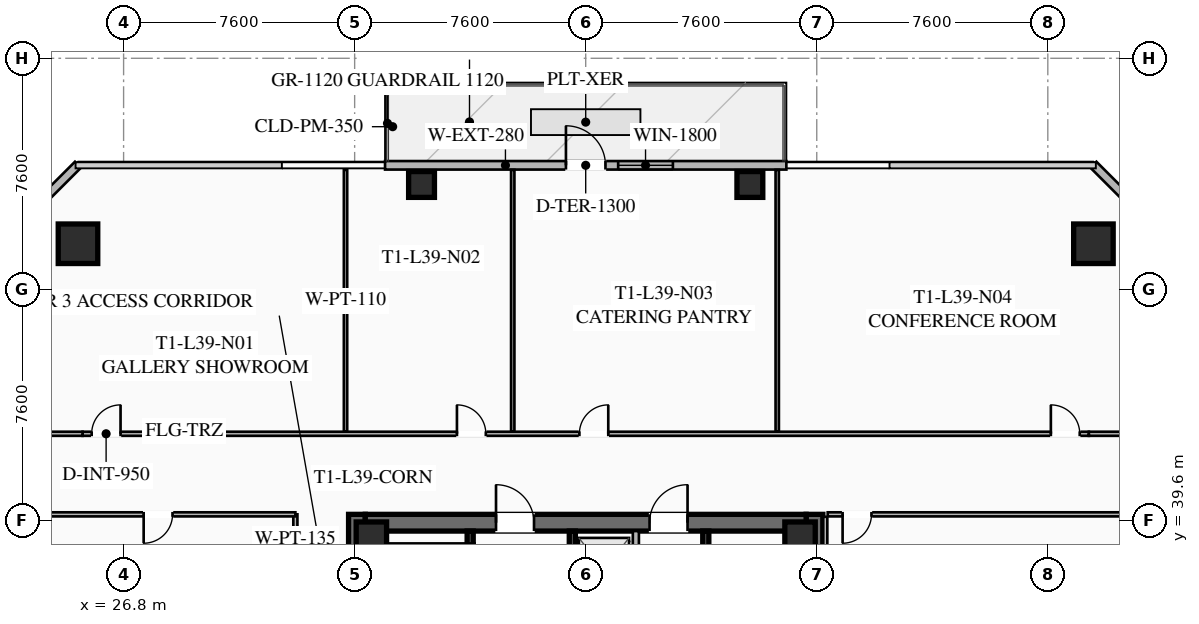
"""IFC4 building model, lengths in metres.
Left out: names, types, materials, properties, quantities, classifications, styles, units other than length and angle.
Written with IfcOpenShell. Run it as: python <this file> out.ifc"""

import sys

from ifc_helpers import new_model, si_unit, direction, frame, frame_2d, origin, origin_2d, place, context, subcontext, project, spatial, rectangle, hollow_rectangle, extrude, element, fill, save


model = new_model("IFC4")
c1 = context("Model", 3, precision=1e-05, world=origin(), true_north=direction((0.0, 1.0)))
c2 = subcontext(c1, "Body", "Model", "MODEL_VIEW")
j1 = project(units=[si_unit("LENGTHUNIT", "METRE"), si_unit("PLANEANGLEUNIT", "RADIAN")], contexts=[c1])
p1 = place(None, origin())
s1 = spatial("IfcSite", under=j1, at=p1, CompositionType="ELEMENT")
p2 = place(p1, origin())
s2 = spatial("IfcBuilding", under=s1, at=p2, CompositionType="ELEMENT")
p3 = place(p2, frame((0.0, 0.0, 146.35)))
s3 = spatial("IfcBuildingStorey", under=s2, at=p3, CompositionType="ELEMENT", Elevation=146.35)
for number, where, z_axis, x_axis in (
    (1, (34.475, 24.2, 0.0), (0.0, 0.0, 1.0), (0.0, 1.0, 0.0)),
    (2, (49.525, 39.8, 0.0), (0.0, 0.0, 1.0), (0.0, -1.0, 0.0)),
):
    element("IfcWall", number, at=place(p3, frame(where, z_axis=z_axis, x_axis=x_axis)), inside=s3, PredefinedType="SHEAR", context=c2, shape_type="SweptSolid", body=[
        extrude(rectangle(XDim=15.6, YDim=0.55, at=frame_2d((7.8, 0.0))), origin(), (0.0, 0.0, 1.0), 3.55),
    ])
p4 = place(p3, frame((34.75, 39.525, 0.0), z_axis=(0.0, 0.0, 1.0), x_axis=(1.0, 0.0, 0.0)))
e3 = element("IfcWall", 3, at=p4, inside=s3, PredefinedType="SHEAR", context=c2, shape_type="SweptSolid", body=[
    extrude(rectangle(XDim=14.5, YDim=0.55, at=frame_2d((7.25, 0.0))), origin(), (0.0, 0.0, 1.0), 3.55),
])
p5 = place(p4, frame((4.3, 0.0, 0.0)))
e4 = element("IfcOpeningElement", 4, at=p5, cuts=e3, PredefinedType="OPENING", context=c2, shape_type="SweptSolid", body=[
    extrude(rectangle(XDim=1.25, YDim=2.25, at=frame_2d((0.625, 1.125))), frame((0.0, 0.285, 0.0), z_axis=(0.0, -1.0, 0.0), x_axis=(1.0, 0.0, 0.0)), (0.0, 0.0, 1.0), 0.57),
])
p6 = place(p4, frame((9.35, 0.0, 0.0)))
e5 = element("IfcOpeningElement", 5, at=p6, cuts=e3, PredefinedType="OPENING", context=c2, shape_type="SweptSolid", body=[
    extrude(rectangle(XDim=1.25, YDim=2.25, at=frame_2d((0.625, 1.125))), frame((0.0, 0.285, 0.0), z_axis=(0.0, -1.0, 0.0), x_axis=(1.0, 0.0, 0.0)), (0.0, 0.0, 1.0), 0.57),
])
for number, where, z_axis, x_axis in (
    (6, (49.05, 39.05, 0.0), (0.0, 0.0, 1.0), (1.0, 0.0, 0.0)),
    (7, (34.95, 39.05, 0.0), (0.0, 0.0, 1.0), (1.0, 0.0, 0.0)),
):
    element("IfcColumn", number, at=place(p3, frame(where, z_axis=z_axis, x_axis=x_axis)), inside=s3, PredefinedType="COLUMN", context=c2, shape_type="SweptSolid", body=[
        extrude(hollow_rectangle(XDim=1.0, YDim=1.0, WallThickness=0.04, at=origin_2d()), origin(), (0.0, 0.0, 1.0), 3.37),
    ])
for number, where, z_axis, x_axis in (
    (8, (58.7, 48.7, 0.0), (0.0, 0.0, 1.0), (1.0, 0.0, 0.0)),
    (9, (25.3, 48.7, 0.0), (0.0, 0.0, 1.0), (1.0, 0.0, 0.0)),
):
    element("IfcColumn", number, at=place(p3, frame(where, z_axis=z_axis, x_axis=x_axis)), inside=s3, PredefinedType="COLUMN", context=c2, shape_type="SweptSolid", body=[
        extrude(hollow_rectangle(XDim=1.3, YDim=1.3, WallThickness=0.05, at=origin_2d()), origin(), (0.0, 0.0, 1.0), 3.37),
    ])
for number, where, z_axis, x_axis in (
    (10, (47.4, 50.65, 0.0), (0.0, 0.0, 1.0), (1.0, 0.0, 0.0)),
    (11, (36.6, 50.65, 0.0), (0.0, 0.0, 1.0), (1.0, 0.0, 0.0)),
):
    element("IfcColumn", number, at=place(p3, frame(where, z_axis=z_axis, x_axis=x_axis)), inside=s3, PredefinedType="COLUMN", context=c2, shape_type="SweptSolid", body=[
        extrude(hollow_rectangle(XDim=0.85, YDim=0.85, WallThickness=0.035, at=origin_2d()), origin(), (0.0, 0.0, 1.0), 3.37),
    ])
p7 = place(p3, frame((35.4, 51.28, 0.0), z_axis=(0.0, 0.0, 1.0), x_axis=(1.0, 0.0, 0.0)))
e12 = element("IfcWall", 12, at=p7, inside=s3, PredefinedType="SOLIDWALL", context=c2, shape_type="SweptSolid", body=[
    extrude(rectangle(XDim=13.2, YDim=0.28, at=frame_2d((6.6, 0.0))), origin(), (0.0, 0.0, 1.0), 3.37),
])
p8 = place(p7, frame((5.95, 0.0, 0.0)))
e13 = element("IfcOpeningElement", 13, at=p8, cuts=e12, PredefinedType="OPENING", context=c2, shape_type="SweptSolid", body=[
    extrude(rectangle(XDim=1.3, YDim=2.15, at=frame_2d((0.65, 1.075))), frame((0.0, 0.15, 0.0), z_axis=(0.0, -1.0, 0.0), x_axis=(1.0, 0.0, 0.0)), (0.0, 0.0, 1.0), 0.3),
])
p9 = place(p7, frame((7.668, 0.0, 0.85)))
e14 = element("IfcOpeningElement", 14, at=p9, cuts=e12, PredefinedType="OPENING", context=c2, shape_type="SweptSolid", body=[
    extrude(rectangle(XDim=1.8, YDim=1.92, at=frame_2d((0.9, 0.96))), frame((0.0, 0.15, 0.0), z_axis=(0.0, -1.0, 0.0), x_axis=(1.0, 0.0, 0.0)), (0.0, 0.0, 1.0), 0.3),
])
for number, where, z_axis, x_axis in (
    (15, (22.7, 48.7, 0.0), (0.0, 0.0, 1.0), (0.707, 0.707, 0.0)),
    (16, (58.7, 51.3, 0.0), (0.0, 0.0, 1.0), (0.707, -0.707, 0.0)),
):
    element("IfcWall", number, at=place(p3, frame(where, z_axis=z_axis, x_axis=x_axis)), inside=s3, PredefinedType="SOLIDWALL", context=c2, shape_type="SweptSolid", body=[
        extrude(rectangle(XDim=3.677, YDim=0.28, at=frame_2d((1.838, 0.0))), origin(), (0.0, 0.0, 1.0), 3.37),
    ])
p10 = place(p3, frame((38.2, 31.2, 0.0), z_axis=(0.0, 0.0, 1.0), x_axis=(0.0, 1.0, 0.0)))
e17 = element("IfcWall", 17, at=p10, inside=s3, PredefinedType="SHEAR", context=c2, shape_type="SweptSolid", body=[
    extrude(rectangle(XDim=8.05, YDim=0.2, at=frame_2d((4.025, 0.0))), origin(), (0.0, 0.0, 1.0), 3.37),
])
p11 = place(p10, frame((0.45, 0.0, 0.0)))
e18 = element("IfcOpeningElement", 18, at=p11, cuts=e17, PredefinedType="OPENING", context=c2, shape_type="SweptSolid", body=[
    extrude(rectangle(XDim=1.15, YDim=2.2, at=frame_2d((0.575, 1.1))), frame((0.0, 0.11, 0.0), z_axis=(0.0, -1.0, 0.0), x_axis=(1.0, 0.0, 0.0)), (0.0, 0.0, 1.0), 0.22),
])
p12 = place(p3, frame((41.56, 24.75, 0.0), z_axis=(0.0, 0.0, 1.0), x_axis=(0.0, 1.0, 0.0)))
e19 = element("IfcWall", 19, at=p12, inside=s3, PredefinedType="SHEAR", context=c2, shape_type="SweptSolid", body=[
    extrude(rectangle(XDim=14.5, YDim=0.2, at=frame_2d((7.25, 0.0))), origin(), (0.0, 0.0, 1.0), 3.37),
])
p13 = place(p3, frame((45.95, 39.25, 0.0), z_axis=(0.0, 0.0, 1.0), x_axis=(0.0, -1.0, 0.0)))
e20 = element("IfcWall", 20, at=p13, inside=s3, PredefinedType="SHEAR", context=c2, shape_type="SweptSolid", body=[
    extrude(rectangle(XDim=6.45, YDim=0.2, at=frame_2d((3.225, 0.0))), origin(), (0.0, 0.0, 1.0), 3.37),
])
p14 = place(p3, frame((43.65, 32.35, 0.0), z_axis=(0.0, 0.0, 1.0), x_axis=(0.0, 1.0, 0.0)))
e21 = element("IfcWall", 21, at=p14, inside=s3, PredefinedType="SOLIDWALL", context=c2, shape_type="SweptSolid", body=[
    extrude(rectangle(XDim=6.9, YDim=0.2, at=frame_2d((3.45, 0.0))), origin(), (0.0, 0.0, 1.0), 3.37),
])
p15 = place(p14, frame((0.575, 0.0, 0.0)))
e22 = element("IfcOpeningElement", 22, at=p15, cuts=e21, PredefinedType="OPENING", context=c2, shape_type="SweptSolid", body=[
    extrude(rectangle(XDim=1.1, YDim=2.2, at=frame_2d((0.55, 1.1))), frame((0.0, 0.11, 0.0), z_axis=(0.0, -1.0, 0.0), x_axis=(1.0, 0.0, 0.0)), (0.0, 0.0, 1.0), 0.22),
])
p16 = place(p14, frame((2.825, 0.0, 0.0)))
e23 = element("IfcOpeningElement", 23, at=p16, cuts=e21, PredefinedType="OPENING", context=c2, shape_type="SweptSolid", body=[
    extrude(rectangle(XDim=1.1, YDim=2.2, at=frame_2d((0.55, 1.1))), frame((0.0, 0.11, 0.0), z_axis=(0.0, -1.0, 0.0), x_axis=(1.0, 0.0, 0.0)), (0.0, 0.0, 1.0), 0.22),
])
p17 = place(p14, frame((5.075, 0.0, 0.0)))
e24 = element("IfcOpeningElement", 24, at=p17, cuts=e21, PredefinedType="OPENING", context=c2, shape_type="SweptSolid", body=[
    extrude(rectangle(XDim=1.1, YDim=2.2, at=frame_2d((0.55, 1.1))), frame((0.0, 0.11, 0.0), z_axis=(0.0, -1.0, 0.0), x_axis=(1.0, 0.0, 0.0)), (0.0, 0.0, 1.0), 0.22),
])
p18 = place(p3, frame((32.45, 35.4, 0.0), z_axis=(0.0, 0.0, 1.0), x_axis=(0.0, 1.0, 0.0)))
e25 = element("IfcWall", 25, at=p18, inside=s3, PredefinedType="PARTITIONING", context=c2, shape_type="SweptSolid", body=[
    extrude(rectangle(XDim=4.4, YDim=0.135, at=frame_2d((2.2, 0.0))), origin(), (0.0, 0.0, 1.0), 2.723),
])
p19 = place(p3, frame((25.45, 42.45, 0.0), z_axis=(0.0, 0.0, 1.0), x_axis=(1.0, 0.0, 0.0)))
e26 = element("IfcWall", 26, at=p19, inside=s3, PredefinedType="PARTITIONING", context=c2, shape_type="SweptSolid", body=[
    extrude(rectangle(XDim=33.1, YDim=0.135, at=frame_2d((16.55, 0.0))), origin(), (0.0, 0.0, 1.0), 2.723),
])
p20 = place(p19, frame((0.3, 0.0, 0.0)))
e27 = element("IfcOpeningElement", 27, at=p20, cuts=e26, PredefinedType="OPENING", context=c2, shape_type="SweptSolid", body=[
    extrude(rectangle(XDim=0.95, YDim=2.05, at=frame_2d((0.475, 1.025))), frame((0.0, 0.077, 0.0), z_axis=(0.0, -1.0, 0.0), x_axis=(1.0, 0.0, 0.0)), (0.0, 0.0, 1.0), 0.155),
])
p21 = place(p19, frame((12.315, 0.0, 0.0)))
e28 = element("IfcOpeningElement", 28, at=p21, cuts=e26, PredefinedType="OPENING", context=c2, shape_type="SweptSolid", body=[
    extrude(rectangle(XDim=0.95, YDim=2.05, at=frame_2d((0.475, 1.025))), frame((0.0, 0.077, 0.0), z_axis=(0.0, -1.0, 0.0), x_axis=(1.0, 0.0, 0.0)), (0.0, 0.0, 1.0), 0.155),
])
p22 = place(p19, frame((16.342, 0.0, 0.0)))
e29 = element("IfcOpeningElement", 29, at=p22, cuts=e26, PredefinedType="OPENING", context=c2, shape_type="SweptSolid", body=[
    extrude(rectangle(XDim=0.95, YDim=2.05, at=frame_2d((0.475, 1.025))), frame((0.0, 0.077, 0.0), z_axis=(0.0, -1.0, 0.0), x_axis=(1.0, 0.0, 0.0)), (0.0, 0.0, 1.0), 0.155),
])
p23 = place(p19, frame((31.85, 0.0, 0.0)))
e30 = element("IfcOpeningElement", 30, at=p23, cuts=e26, PredefinedType="OPENING", context=c2, shape_type="SweptSolid", body=[
    extrude(rectangle(XDim=0.95, YDim=2.05, at=frame_2d((0.475, 1.025))), frame((0.0, 0.077, 0.0), z_axis=(0.0, -1.0, 0.0), x_axis=(1.0, 0.0, 0.0)), (0.0, 0.0, 1.0), 0.155),
])
for number, where, z_axis, x_axis in (
    (31, (22.72, 42.45, 0.0), (0.0, 0.0, 1.0), (1.0, 0.0, 0.0)),
    (32, (58.55, 42.45, 0.0), (0.0, 0.0, 1.0), (1.0, 0.0, 0.0)),
):
    element("IfcWall", number, at=place(p3, frame(where, z_axis=z_axis, x_axis=x_axis)), inside=s3, PredefinedType="PARTITIONING", context=c2, shape_type="SweptSolid", body=[
        extrude(rectangle(XDim=2.73, YDim=0.135, at=frame_2d((1.365, 0.0))), origin(), (0.0, 0.0, 1.0), 2.723),
    ])
for number, where, z_axis, x_axis in (
    (33, (34.1, 42.53, 0.0), (0.0, 0.0, 1.0), (0.0, 1.0, 0.0)),
    (34, (39.6, 42.53, 0.0), (0.0, 0.0, 1.0), (0.0, 1.0, 0.0)),
    (35, (48.3, 42.53, 0.0), (0.0, 0.0, 1.0), (0.0, 1.0, 0.0)),
):
    element("IfcWall", number, at=place(p3, frame(where, z_axis=z_axis, x_axis=x_axis)), inside=s3, PredefinedType="PARTITIONING", context=c2, shape_type="SweptSolid", body=[
        extrude(rectangle(XDim=8.6, YDim=0.11, at=frame_2d((4.3, 0.0))), origin(), (0.0, 0.0, 1.0), 2.723),
    ])
p24 = place(p3, frame((49.88, 39.72, 0.0), z_axis=(0.0, 0.0, 1.0), x_axis=(0.0, -1.0, 0.0)))
e36 = element("IfcWall", 36, at=p24, inside=s3, PredefinedType="PARTITIONING", context=c2, shape_type="SweptSolid", body=[
    extrude(rectangle(XDim=15.44, YDim=0.135, at=frame_2d((7.72, 0.0))), origin(), (0.0, 0.0, 1.0), 2.723),
])
p25 = place(p3, frame((61.28, 39.8, 0.0), z_axis=(0.0, 0.0, 1.0), x_axis=(-1.0, 0.0, 0.0)))
e37 = element("IfcWall", 37, at=p25, inside=s3, PredefinedType="PARTITIONING", context=c2, shape_type="SweptSolid", body=[
    extrude(rectangle(XDim=11.32, YDim=0.135, at=frame_2d((5.66, 0.0))), origin(), (0.0, 0.0, 1.0), 2.723),
])
p26 = place(p25, frame((9.88, 0.0, 0.0)))
e38 = element("IfcOpeningElement", 38, at=p26, cuts=e37, PredefinedType="OPENING", context=c2, shape_type="SweptSolid", body=[
    extrude(rectangle(XDim=0.95, YDim=2.05, at=frame_2d((0.475, 1.025))), frame((0.0, 0.077, 0.0), z_axis=(0.0, -1.0, 0.0), x_axis=(1.0, 0.0, 0.0)), (0.0, 0.0, 1.0), 0.155),
])
p27 = place(p3, frame((32.45, 39.8, 0.0), z_axis=(0.0, 0.0, 1.0), x_axis=(-1.0, 0.0, 0.0)))
e39 = element("IfcWall", 39, at=p27, inside=s3, PredefinedType="PARTITIONING", context=c2, shape_type="SweptSolid", body=[
    extrude(rectangle(XDim=9.73, YDim=0.135, at=frame_2d((4.865, 0.0))), origin(), (0.0, 0.0, 1.0), 2.723),
])
p28 = place(p27, frame((4.04, 0.0, 0.0)))
e40 = element("IfcOpeningElement", 40, at=p28, cuts=e39, PredefinedType="OPENING", context=c2, shape_type="SweptSolid", body=[
    extrude(rectangle(XDim=0.95, YDim=2.05, at=frame_2d((0.475, 1.025))), frame((0.0, 0.077, 0.0), z_axis=(0.0, -1.0, 0.0), x_axis=(1.0, 0.0, 0.0)), (0.0, 0.0, 1.0), 0.155),
])
p29 = place(p8, origin())
e41 = element("IfcDoor", 41, at=p29, inside=s3, OperationType="SINGLE_SWING_LEFT", PredefinedType="DOOR", context=c2, shape_type="SweptSolid", body=[
    extrude(rectangle(XDim=1.3, YDim=2.15, at=frame_2d((0.65, 1.075))), frame((0.0, 0.025, 0.0), z_axis=(0.0, -1.0, 0.0), x_axis=(1.0, 0.0, 0.0)), (0.0, 0.0, 1.0), 0.05),
])
fill(e13, e41)
p30 = place(p9, origin())
e42 = element("IfcWindow", 42, at=p30, inside=s3, PartitioningType="SINGLE_PANEL", PredefinedType="WINDOW", context=c2, shape_type="SweptSolid", body=[
    extrude(rectangle(XDim=1.8, YDim=1.92, at=frame_2d((0.9, 0.96))), frame((0.0, 0.03, 0.0), z_axis=(0.0, -1.0, 0.0), x_axis=(1.0, 0.0, 0.0)), (0.0, 0.0, 1.0), 0.06),
])
fill(e14, e42)
p31 = place(p5, origin())
e43 = element("IfcDoor", 43, at=p31, inside=s3, OperationType="SINGLE_SWING_LEFT", PredefinedType="DOOR", context=c2, shape_type="SweptSolid", body=[
    extrude(rectangle(XDim=1.25, YDim=2.25, at=frame_2d((0.625, 1.125))), frame((0.0, 0.025, 0.0), z_axis=(0.0, -1.0, 0.0), x_axis=(1.0, 0.0, 0.0)), (0.0, 0.0, 1.0), 0.05),
])
fill(e4, e43)
p32 = place(p6, origin())
e44 = element("IfcDoor", 44, at=p32, inside=s3, OperationType="SINGLE_SWING_RIGHT", PredefinedType="DOOR", context=c2, shape_type="SweptSolid", body=[
    extrude(rectangle(XDim=1.25, YDim=2.25, at=frame_2d((0.625, 1.125))), frame((0.0, 0.025, 0.0), z_axis=(0.0, -1.0, 0.0), x_axis=(1.0, 0.0, 0.0)), (0.0, 0.0, 1.0), 0.05),
])
fill(e5, e44)
p33 = place(p20, origin())
e45 = element("IfcDoor", 45, at=p33, inside=s3, OperationType="SINGLE_SWING_RIGHT", PredefinedType="DOOR", context=c2, shape_type="SweptSolid", body=[
    extrude(rectangle(XDim=0.95, YDim=2.05, at=frame_2d((0.475, 1.025))), frame((0.0, 0.025, 0.0), z_axis=(0.0, -1.0, 0.0), x_axis=(1.0, 0.0, 0.0)), (0.0, 0.0, 1.0), 0.05),
])
fill(e27, e45)
p34 = place(p21, origin())
e46 = element("IfcDoor", 46, at=p34, inside=s3, OperationType="SINGLE_SWING_LEFT", PredefinedType="DOOR", context=c2, shape_type="SweptSolid", body=[
    extrude(rectangle(XDim=0.95, YDim=2.05, at=frame_2d((0.475, 1.025))), frame((0.0, 0.025, 0.0), z_axis=(0.0, -1.0, 0.0), x_axis=(1.0, 0.0, 0.0)), (0.0, 0.0, 1.0), 0.05),
])
fill(e28, e46)
p35 = place(p22, origin())
e47 = element("IfcDoor", 47, at=p35, inside=s3, OperationType="SINGLE_SWING_RIGHT", PredefinedType="DOOR", context=c2, shape_type="SweptSolid", body=[
    extrude(rectangle(XDim=0.95, YDim=2.05, at=frame_2d((0.475, 1.025))), frame((0.0, 0.025, 0.0), z_axis=(0.0, -1.0, 0.0), x_axis=(1.0, 0.0, 0.0)), (0.0, 0.0, 1.0), 0.05),
])
fill(e29, e47)
p36 = place(p23, origin())
e48 = element("IfcDoor", 48, at=p36, inside=s3, OperationType="SINGLE_SWING_LEFT", PredefinedType="DOOR", context=c2, shape_type="SweptSolid", body=[
    extrude(rectangle(XDim=0.95, YDim=2.05, at=frame_2d((0.475, 1.025))), frame((0.0, 0.025, 0.0), z_axis=(0.0, -1.0, 0.0), x_axis=(1.0, 0.0, 0.0)), (0.0, 0.0, 1.0), 0.05),
])
fill(e30, e48)
p37 = place(p26, origin())
e49 = element("IfcDoor", 49, at=p37, inside=s3, OperationType="SINGLE_SWING_RIGHT", PredefinedType="DOOR", context=c2, shape_type="SweptSolid", body=[
    extrude(rectangle(XDim=0.95, YDim=2.05, at=frame_2d((0.475, 1.025))), frame((0.0, 0.025, 0.0), z_axis=(0.0, -1.0, 0.0), x_axis=(1.0, 0.0, 0.0)), (0.0, 0.0, 1.0), 0.05),
])
fill(e38, e49)
p38 = place(p28, origin())
e50 = element("IfcDoor", 50, at=p38, inside=s3, OperationType="SINGLE_SWING_RIGHT", PredefinedType="DOOR", context=c2, shape_type="SweptSolid", body=[
    extrude(rectangle(XDim=0.95, YDim=2.05, at=frame_2d((0.475, 1.025))), frame((0.0, 0.025, 0.0), z_axis=(0.0, -1.0, 0.0), x_axis=(1.0, 0.0, 0.0)), (0.0, 0.0, 1.0), 0.05),
])
fill(e40, e50)
save(model, sys.argv[1])
